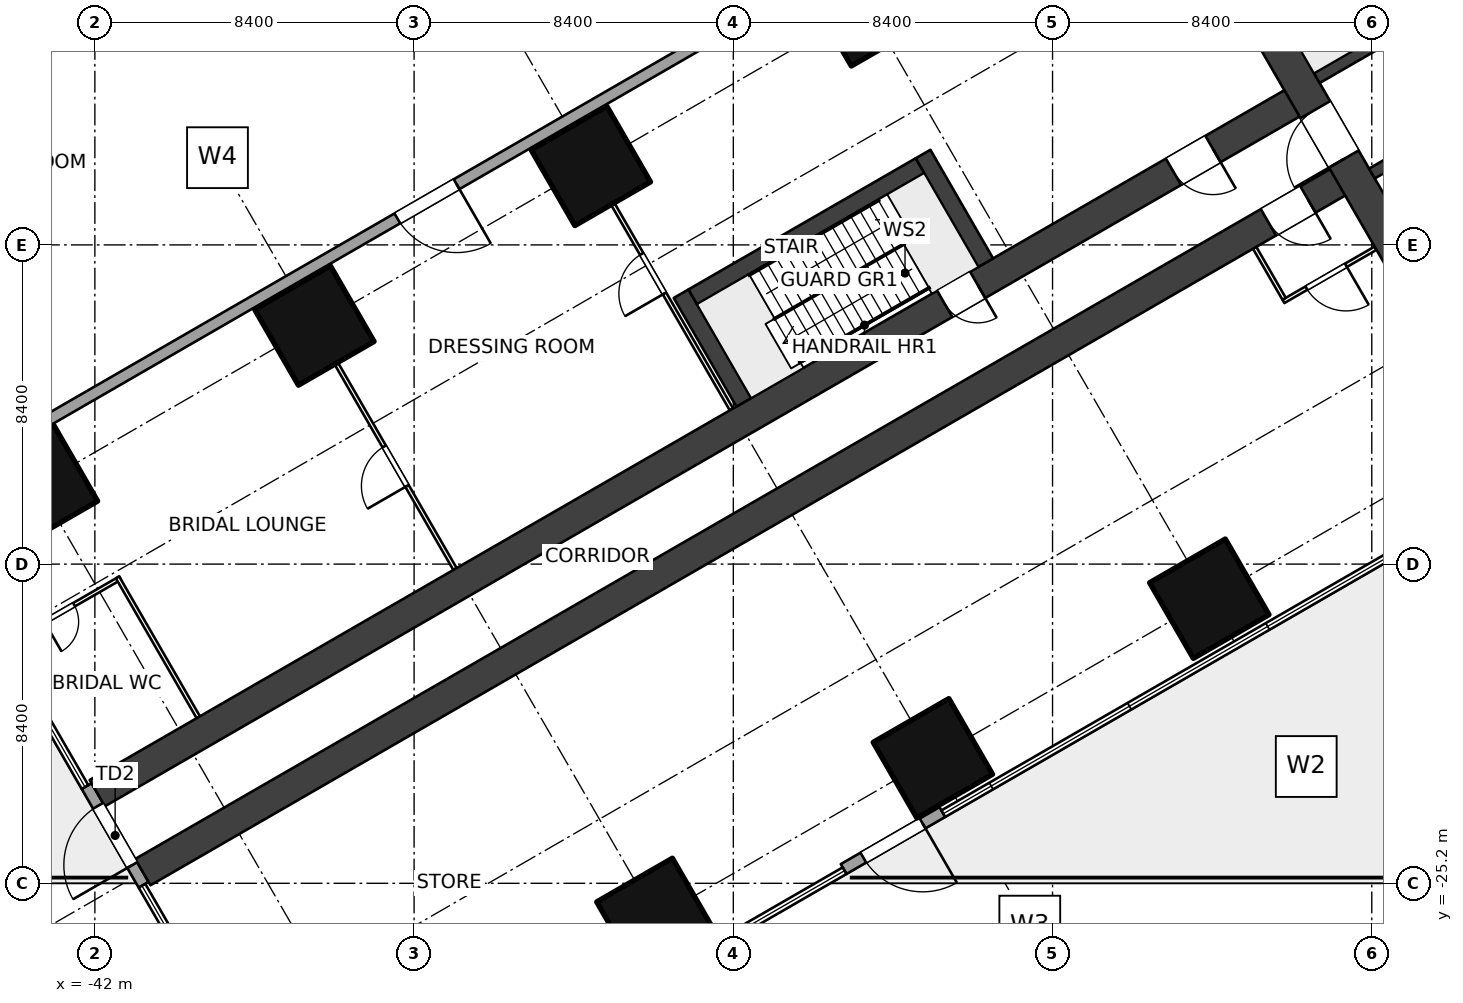
"""IFC4 building model, lengths in metres.
Left out: names, types, materials, properties, quantities, classifications, styles, units other than length and angle.
Written with IfcOpenShell. Run it as: python <this file> out.ifc"""

import sys

from ifc_helpers import new_model, si_unit, direction, frame, frame_2d, origin, origin_2d, place, context, subcontext, project, spatial, rectangle, extrude, element, fill, save


model = new_model("IFC4")
c1 = context("Model", 3, precision=1e-05, world=origin(), true_north=direction((0.0, 1.0)))
c2 = subcontext(c1, "Body", "Model", "MODEL_VIEW")
j1 = project(units=[si_unit("LENGTHUNIT", "METRE"), si_unit("PLANEANGLEUNIT", "RADIAN")], contexts=[c1])
p1 = place(None, origin())
s1 = spatial("IfcSite", under=j1, at=p1, CompositionType="ELEMENT")
p2 = place(p1, origin())
s2 = spatial("IfcBuilding", under=s1, at=p2, CompositionType="ELEMENT")
p3 = place(p2, frame((0.0, 0.0, 16.0)))
s3 = spatial("IfcBuildingStorey", under=s2, at=p3, CompositionType="ELEMENT", Elevation=16.0)
for number, where, z_axis, x_axis in (
    (1, (-12.675, -17.71, 0.0), (0.0, 0.0, 1.0), (-0.5, 0.866, 0.0)),
    (2, (-21.675, -2.122, 0.0), (0.0, 0.0, 1.0), (-0.5, 0.866, 0.0)),
    (3, (-19.949, -21.91, 0.0), (0.0, 0.0, 1.0), (-0.5, 0.866, 0.0)),
    (4, (-28.949, -6.322, 0.0), (0.0, 0.0, 1.0), (-0.5, 0.866, 0.0)),
    (5, (-27.224, -26.11, 0.0), (0.0, 0.0, 1.0), (-0.5, 0.866, 0.0)),
    (6, (-36.224, -10.521, 0.0), (0.0, 0.0, 1.0), (-0.5, 0.866, 0.0)),
    (7, (-43.499, -14.721, 0.0), (0.0, 0.0, 1.0), (-0.5, 0.866, 0.0)),
):
    element("IfcColumn", number, at=place(p3, frame(where, z_axis=z_axis, x_axis=x_axis)), inside=s3, PredefinedType="COLUMN", context=c2, shape_type="SweptSolid", body=[
        extrude(rectangle(XDim=2.3, YDim=2.3, at=origin_2d()), origin(), (0.0, 0.0, 1.0), 5.0),
    ])
p4 = place(p3, frame((-6.47, -10.757, 0.0), z_axis=(0.0, 0.0, 1.0), x_axis=(-0.499997612506, 0.8660267822, 0.0)))
e8 = element("IfcWall", 8, at=p4, inside=s3, PredefinedType="SHEAR", context=c2, shape_type="SweptSolid", body=[
    extrude(rectangle(XDim=12.161, YDim=0.9, at=frame_2d((6.08, 0.0))), origin(), (0.0, 0.0, 1.0), 5.0),
])
p5 = place(p4, frame((5.33, 0.0, 0.0)))
e9 = element("IfcOpeningElement", 9, at=p5, cuts=e8, PredefinedType="OPENING", context=c2, shape_type="SweptSolid", body=[
    extrude(rectangle(XDim=1.5, YDim=2.1, at=frame_2d((0.75, 1.05))), frame((0.0, 0.46, 0.0), z_axis=(0.0, -1.0, 0.0), x_axis=(1.0, 0.0, 0.0)), (0.0, 0.0, 1.0), 0.92),
])
p6 = place(p3, frame((-3.869, -0.559, 0.0), z_axis=(0.0, 0.0, 1.0), x_axis=(-0.86602711848, -0.499997030048, 0.0)))
e10 = element("IfcWall", 10, at=p6, inside=s3, PredefinedType="SHEAR", context=c2, shape_type="SweptSolid", body=[
    extrude(rectangle(XDim=6.901, YDim=0.3, at=frame_2d((3.451, 0.0))), origin(), (0.0, 0.0, 1.0), 5.0),
])
p7 = place(p6, frame((0.25, 0.0, 0.0)))
e11 = element("IfcOpeningElement", 11, at=p7, cuts=e10, PredefinedType="OPENING", context=c2, shape_type="SweptSolid", body=[
    extrude(rectangle(XDim=1.0, YDim=2.1, at=frame_2d((0.5, 1.05))), frame((0.0, 0.16, 0.0), z_axis=(0.0, -1.0, 0.0), x_axis=(1.0, 0.0, 0.0)), (0.0, 0.0, 1.0), 0.32),
])
p8 = place(p3, frame((-2.419, -3.071, 0.0), z_axis=(0.0, 0.0, 1.0), x_axis=(-0.86602711848, -0.499997030048, 0.0)))
e12 = element("IfcWall", 12, at=p8, inside=s3, PredefinedType="SHEAR", context=c2, shape_type="SweptSolid", body=[
    extrude(rectangle(XDim=6.901, YDim=0.3, at=frame_2d((3.451, 0.0))), origin(), (0.0, 0.0, 1.0), 5.0),
])
p9 = place(p8, frame((4.85, 0.0, 0.0)))
e13 = element("IfcOpeningElement", 13, at=p9, cuts=e12, PredefinedType="OPENING", context=c2, shape_type="SweptSolid", body=[
    extrude(rectangle(XDim=1.1, YDim=2.1, at=frame_2d((0.55, 1.05))), frame((0.0, 0.16, 0.0), z_axis=(0.0, -1.0, 0.0), x_axis=(1.0, 0.0, 0.0)), (0.0, 0.0, 1.0), 0.32),
])
p10 = place(p3, frame((-8.91, -6.53, 0.0), z_axis=(0.0, 0.0, 1.0), x_axis=(-0.866025284237, -0.500000207062, 0.0)))
e14 = element("IfcWall", 14, at=p10, inside=s3, PredefinedType="SHEAR", context=c2, shape_type="SweptSolid", body=[
    extrude(rectangle(XDim=36.75, YDim=0.8, at=frame_2d((18.375, 0.0))), origin(), (0.0, 0.0, 1.0), 5.0),
])
p11 = place(p10, frame((1.35, 0.0, 0.0)))
e15 = element("IfcOpeningElement", 15, at=p11, cuts=e14, PredefinedType="OPENING", context=c2, shape_type="SweptSolid", body=[
    extrude(rectangle(XDim=1.2, YDim=2.1, at=frame_2d((0.6, 1.05))), frame((0.0, 0.41, 0.0), z_axis=(0.0, -1.0, 0.0), x_axis=(1.0, 0.0, 0.0)), (0.0, 0.0, 1.0), 0.82),
])
p12 = place(p3, frame((-10.11, -4.451, 0.0), z_axis=(0.0, 0.0, 1.0), x_axis=(-0.866025284237, -0.500000207062, 0.0)))
e16 = element("IfcWall", 16, at=p12, inside=s3, PredefinedType="SHEAR", context=c2, shape_type="SweptSolid", body=[
    extrude(rectangle(XDim=36.75, YDim=0.8, at=frame_2d((18.375, 0.0))), origin(), (0.0, 0.0, 1.0), 5.0),
])
p13 = place(p12, frame((10.0, 0.0, 0.0)))
e17 = element("IfcOpeningElement", 17, at=p13, cuts=e16, PredefinedType="OPENING", context=c2, shape_type="SweptSolid", body=[
    extrude(rectangle(XDim=1.0, YDim=2.1, at=frame_2d((0.5, 1.05))), frame((0.0, 0.41, 0.0), z_axis=(0.0, -1.0, 0.0), x_axis=(1.0, 0.0, 0.0)), (0.0, 0.0, 1.0), 0.82),
])
p14 = place(p12, frame((2.85, 0.0, 0.0)))
e18 = element("IfcOpeningElement", 18, at=p14, cuts=e16, PredefinedType="OPENING", context=c2, shape_type="SweptSolid", body=[
    extrude(rectangle(XDim=1.2, YDim=2.1, at=frame_2d((0.6, 1.05))), frame((0.0, 0.41, 0.0), z_axis=(0.0, -1.0, 0.0), x_axis=(1.0, 0.0, 0.0)), (0.0, 0.0, 1.0), 0.82),
])
p15 = place(p3, frame((-40.717, -25.24, 0.0), z_axis=(0.0, 0.0, 1.0), x_axis=(-0.50002537861, 0.866010750942, 0.0)))
e19 = element("IfcWall", 19, at=p15, inside=s3, PredefinedType="SOLIDWALL", context=c2, shape_type="SweptSolid", body=[
    extrude(rectangle(XDim=3.0, YDim=0.3, at=frame_2d((1.5, 0.0))), origin(), (0.0, 0.0, 1.0), 4.7),
])
p16 = place(p15, frame((0.6, 0.0, 0.0)))
e20 = element("IfcOpeningElement", 20, at=p16, cuts=e19, PredefinedType="OPENING", context=c2, shape_type="SweptSolid", body=[
    extrude(rectangle(XDim=1.8, YDim=2.4, at=frame_2d((0.9, 1.2))), frame((0.0, 0.16, 0.0), z_axis=(0.0, -1.0, 0.0), x_axis=(1.0, 0.0, 0.0)), (0.0, 0.0, 1.0), 0.32),
])
p17 = place(p3, frame((-19.699, -23.325, 0.0), z_axis=(0.0, 0.0, 1.0), x_axis=(-0.866031096941, -0.499990139034, 0.0)))
e21 = element("IfcWall", 21, at=p17, inside=s3, PredefinedType="SOLIDWALL", context=c2, shape_type="SweptSolid", body=[
    extrude(rectangle(XDim=3.0, YDim=0.3, at=frame_2d((1.5, 0.0))), origin(), (0.0, 0.0, 1.0), 4.7),
])
p18 = place(p17, frame((0.6, 0.0, 0.0)))
e22 = element("IfcOpeningElement", 22, at=p18, cuts=e21, PredefinedType="OPENING", context=c2, shape_type="SweptSolid", body=[
    extrude(rectangle(XDim=1.8, YDim=2.4, at=frame_2d((0.9, 1.2))), frame((0.0, 0.16, 0.0), z_axis=(0.0, -1.0, 0.0), x_axis=(1.0, 0.0, 0.0)), (0.0, 0.0, 1.0), 0.32),
])
p19 = place(p3, frame((-8.3, -8.487, 0.0), z_axis=(0.0, 0.0, 1.0), x_axis=(-0.866034573852, -0.49998411664, 0.0)))
e23 = element("IfcWall", 23, at=p19, inside=s3, PredefinedType="PARTITIONING", context=c2, shape_type="SweptSolid", body=[
    extrude(rectangle(XDim=2.8, YDim=0.1, at=frame_2d((1.4, 0.0))), origin(), (0.0, 0.0, 1.0), 4.7),
])
p20 = place(p19, frame((0.9, 0.0, 0.0)))
e24 = element("IfcOpeningElement", 24, at=p20, cuts=e23, PredefinedType="OPENING", context=c2, shape_type="SweptSolid", body=[
    extrude(rectangle(XDim=1.2, YDim=2.1, at=frame_2d((0.6, 1.05))), frame((0.0, 0.06, 0.0), z_axis=(0.0, -1.0, 0.0), x_axis=(1.0, 0.0, 0.0)), (0.0, 0.0, 1.0), 0.12),
])
p21 = place(p3, frame((-11.482, -8.476, 0.0), z_axis=(0.0, 0.0, 1.0), x_axis=(0.500017819788, -0.86601511528, 0.0)))
e25 = element("IfcWall", 25, at=p21, inside=s3, PredefinedType="PARTITIONING", context=c2, shape_type="SweptSolid", body=[
    extrude(rectangle(XDim=1.55, YDim=0.1, at=frame_2d((0.775, 0.0))), origin(), (0.0, 0.0, 1.0), 4.7),
])
p22 = place(p3, frame((-25.249, -12.73, 0.0), z_axis=(0.0, 0.0, 1.0), x_axis=(-0.499987320047, 0.866032724435, 0.0)))
e26 = element("IfcWall", 26, at=p22, inside=s3, PredefinedType="PARTITIONING", context=c2, shape_type="SweptSolid", body=[
    extrude(rectangle(XDim=6.25, YDim=0.1, at=frame_2d((3.125, 0.0))), origin(), (0.0, 0.0, 1.0), 2.9),
])
p23 = place(p22, frame((3.525, 0.0, 0.0)))
e27 = element("IfcOpeningElement", 27, at=p23, cuts=e26, PredefinedType="OPENING", context=c2, shape_type="SweptSolid", body=[
    extrude(rectangle(XDim=1.2, YDim=2.1, at=frame_2d((0.6, 1.05))), frame((0.0, 0.06, 0.0), z_axis=(0.0, -1.0, 0.0), x_axis=(1.0, 0.0, 0.0)), (0.0, 0.0, 1.0), 0.12),
])
p24 = place(p3, frame((-32.524, -16.93, 0.0), z_axis=(0.0, 0.0, 1.0), x_axis=(-0.500004234368, 0.866022959057, 0.0)))
e28 = element("IfcWall", 28, at=p24, inside=s3, PredefinedType="PARTITIONING", context=c2, shape_type="SweptSolid", body=[
    extrude(rectangle(XDim=6.25, YDim=0.1, at=frame_2d((3.125, 0.0))), origin(), (0.0, 0.0, 1.0), 2.9),
])
p25 = place(p24, frame((2.525, 0.0, 0.0)))
e29 = element("IfcOpeningElement", 29, at=p25, cuts=e28, PredefinedType="OPENING", context=c2, shape_type="SweptSolid", body=[
    extrude(rectangle(XDim=1.2, YDim=2.1, at=frame_2d((0.6, 1.05))), frame((0.0, 0.06, 0.0), z_axis=(0.0, -1.0, 0.0), x_axis=(1.0, 0.0, 0.0)), (0.0, 0.0, 1.0), 0.12),
])
p26 = place(p3, frame((-41.335, -17.168, 0.0), z_axis=(0.0, 0.0, 1.0), x_axis=(-0.866020032806, -0.500009302692, 0.0)))
e30 = element("IfcWall", 30, at=p26, inside=s3, PredefinedType="PARTITIONING", context=c2, shape_type="SweptSolid", body=[
    extrude(rectangle(XDim=3.487, YDim=0.1, at=frame_2d((1.744, 0.0))), origin(), (0.0, 0.0, 1.0), 4.7),
])
p27 = place(p26, frame((1.4, 0.0, 0.0)))
e31 = element("IfcOpeningElement", 31, at=p27, cuts=e30, PredefinedType="OPENING", context=c2, shape_type="SweptSolid", body=[
    extrude(rectangle(XDim=0.9, YDim=2.1, at=frame_2d((0.45, 1.05))), frame((0.0, 0.06, 0.0), z_axis=(0.0, -1.0, 0.0), x_axis=(1.0, 0.0, 0.0)), (0.0, 0.0, 1.0), 0.12),
])
p28 = place(p3, frame((-39.279, -20.83, 0.0), z_axis=(0.0, 0.0, 1.0), x_axis=(-0.499994284652, 0.866028703517, 0.0)))
e32 = element("IfcWall", 32, at=p28, inside=s3, PredefinedType="PARTITIONING", context=c2, shape_type="SweptSolid", body=[
    extrude(rectangle(XDim=4.25, YDim=0.1, at=frame_2d((2.125, 0.0))), origin(), (0.0, 0.0, 1.0), 2.9),
])
p29 = place(p3, frame((-9.45, 6.495, 0.0), z_axis=(0.0, 0.0, 1.0), x_axis=(-0.866025301493, -0.500000177174, 0.0)))
e33 = element("IfcWall", 33, at=p29, inside=s3, PredefinedType="SOLIDWALL", context=c2, shape_type="SweptSolid", body=[
    extrude(rectangle(XDim=43.095, YDim=0.3, at=frame_2d((21.548, 0.0))), origin(), (0.0, 0.0, 1.0), 4.7),
])
p30 = place(p29, frame((26.595, 0.0, 0.0)))
e34 = element("IfcOpeningElement", 34, at=p30, cuts=e33, PredefinedType="OPENING", context=c2, shape_type="SweptSolid", body=[
    extrude(rectangle(XDim=1.8, YDim=2.4, at=frame_2d((0.9, 1.2))), frame((0.0, 0.16, 0.0), z_axis=(0.0, -1.0, 0.0), x_axis=(1.0, 0.0, 0.0)), (0.0, 0.0, 1.0), 0.32),
])
for number, where, z_axis, x_axis in (
    (35, (-18.559, -8.868, 0.0), (0.0, 0.0, 1.0), (-0.5, 0.866, 0.0)),
    (36, (-24.925, -12.543, 0.0), (0.0, 0.0, 1.0), (-0.5, 0.866, 0.0)),
):
    element("IfcWall", number, at=place(p3, frame(where, z_axis=z_axis, x_axis=x_axis)), inside=s3, PredefinedType="SOLIDWALL", context=c2, shape_type="SweptSolid", body=[
        extrude(rectangle(XDim=3.3, YDim=0.45, at=frame_2d((1.65, 0.0))), origin(), (0.0, 0.0, 1.0), 5.0),
    ])
p31 = place(p3, frame((-20.292, -6.317, 0.0), z_axis=(0.0, 0.0, 1.0), x_axis=(-0.866028853923, -0.499994024137, 0.0)))
e37 = element("IfcWall", 37, at=p31, inside=s3, PredefinedType="SOLIDWALL", context=c2, shape_type="SweptSolid", body=[
    extrude(rectangle(XDim=6.9, YDim=0.45, at=frame_2d((3.45, 0.0))), origin(), (0.0, 0.0, 1.0), 5.0),
])
p32 = place(p16, origin())
e38 = element("IfcDoor", 38, at=p32, inside=s3, OperationType="DOUBLE_DOOR_SINGLE_SWING", PredefinedType="DOOR", context=c2, shape_type="SweptSolid", body=[
    extrude(rectangle(XDim=1.8, YDim=2.4, at=frame_2d((0.9, 1.2))), frame((0.0, 0.025, 0.0), z_axis=(0.0, -1.0, 0.0), x_axis=(1.0, 0.0, 0.0)), (0.0, 0.0, 1.0), 0.05),
])
fill(e20, e38)
p33 = place(p18, origin())
e39 = element("IfcDoor", 39, at=p33, inside=s3, OperationType="DOUBLE_DOOR_SINGLE_SWING", PredefinedType="DOOR", context=c2, shape_type="SweptSolid", body=[
    extrude(rectangle(XDim=1.8, YDim=2.4, at=frame_2d((0.9, 1.2))), frame((0.0, 0.025, 0.0), z_axis=(0.0, -1.0, 0.0), x_axis=(1.0, 0.0, 0.0)), (0.0, 0.0, 1.0), 0.05),
])
fill(e22, e39)
p34 = place(p5, origin())
e40 = element("IfcDoor", 40, at=p34, inside=s3, OperationType="DOUBLE_DOOR_DOUBLE_SWING", PredefinedType="DOOR", context=c2, shape_type="SweptSolid", body=[
    extrude(rectangle(XDim=1.5, YDim=2.1, at=frame_2d((0.75, 1.05))), frame((0.0, 0.025, 0.0), z_axis=(0.0, -1.0, 0.0), x_axis=(1.0, 0.0, 0.0)), (0.0, 0.0, 1.0), 0.05),
])
fill(e9, e40)
p35 = place(p13, origin())
e41 = element("IfcDoor", 41, at=p35, inside=s3, OperationType="SINGLE_SWING_LEFT", PredefinedType="DOOR", context=c2, shape_type="SweptSolid", body=[
    extrude(rectangle(XDim=1.0, YDim=2.1, at=frame_2d((0.5, 1.05))), frame((0.0, 0.025, 0.0), z_axis=(0.0, -1.0, 0.0), x_axis=(1.0, 0.0, 0.0)), (0.0, 0.0, 1.0), 0.05),
])
fill(e17, e41)
p36 = place(p11, origin())
e42 = element("IfcDoor", 42, at=p36, inside=s3, OperationType="DOUBLE_SWING_LEFT", PredefinedType="DOOR", context=c2, shape_type="SweptSolid", body=[
    extrude(rectangle(XDim=1.2, YDim=2.1, at=frame_2d((0.6, 1.05))), frame((0.0, 0.025, 0.0), z_axis=(0.0, -1.0, 0.0), x_axis=(1.0, 0.0, 0.0)), (0.0, 0.0, 1.0), 0.05),
])
fill(e15, e42)
p37 = place(p20, origin())
e43 = element("IfcDoor", 43, at=p37, inside=s3, OperationType="DOUBLE_SWING_LEFT", PredefinedType="DOOR", context=c2, shape_type="SweptSolid", body=[
    extrude(rectangle(XDim=1.2, YDim=2.1, at=frame_2d((0.6, 1.05))), frame((0.0, 0.025, 0.0), z_axis=(0.0, -1.0, 0.0), x_axis=(1.0, 0.0, 0.0)), (0.0, 0.0, 1.0), 0.05),
])
fill(e24, e43)
p38 = place(p23, origin())
e44 = element("IfcDoor", 44, at=p38, inside=s3, OperationType="DOUBLE_SWING_LEFT", PredefinedType="DOOR", context=c2, shape_type="SweptSolid", body=[
    extrude(rectangle(XDim=1.2, YDim=2.1, at=frame_2d((0.6, 1.05))), frame((0.0, 0.025, 0.0), z_axis=(0.0, -1.0, 0.0), x_axis=(1.0, 0.0, 0.0)), (0.0, 0.0, 1.0), 0.05),
])
fill(e27, e44)
p39 = place(p25, origin())
e45 = element("IfcDoor", 45, at=p39, inside=s3, OperationType="DOUBLE_SWING_LEFT", PredefinedType="DOOR", context=c2, shape_type="SweptSolid", body=[
    extrude(rectangle(XDim=1.2, YDim=2.1, at=frame_2d((0.6, 1.05))), frame((0.0, 0.025, 0.0), z_axis=(0.0, -1.0, 0.0), x_axis=(1.0, 0.0, 0.0)), (0.0, 0.0, 1.0), 0.05),
])
fill(e29, e45)
p40 = place(p27, origin())
e46 = element("IfcDoor", 46, at=p40, inside=s3, OperationType="SINGLE_SWING_RIGHT", PredefinedType="DOOR", context=c2, shape_type="SweptSolid", body=[
    extrude(rectangle(XDim=0.9, YDim=2.1, at=frame_2d((0.45, 1.05))), frame((0.0, 0.025, 0.0), z_axis=(0.0, -1.0, 0.0), x_axis=(1.0, 0.0, 0.0)), (0.0, 0.0, 1.0), 0.05),
])
fill(e31, e46)
p41 = place(p14, origin())
e47 = element("IfcDoor", 47, at=p41, inside=s3, OperationType="DOUBLE_SWING_LEFT", PredefinedType="DOOR", context=c2, shape_type="SweptSolid", body=[
    extrude(rectangle(XDim=1.2, YDim=2.1, at=frame_2d((0.6, 1.05))), frame((0.0, 0.025, 0.0), z_axis=(0.0, -1.0, 0.0), x_axis=(1.0, 0.0, 0.0)), (0.0, 0.0, 1.0), 0.05),
])
fill(e18, e47)
p42 = place(p30, origin())
e48 = element("IfcDoor", 48, at=p42, inside=s3, OperationType="DOUBLE_DOOR_DOUBLE_SWING", PredefinedType="DOOR", context=c2, shape_type="SweptSolid", body=[
    extrude(rectangle(XDim=1.8, YDim=2.4, at=frame_2d((0.9, 1.2))), frame((0.0, 0.025, 0.0), z_axis=(0.0, -1.0, 0.0), x_axis=(1.0, 0.0, 0.0)), (0.0, 0.0, 1.0), 0.05),
])
fill(e34, e48)
save(model, sys.argv[1])
